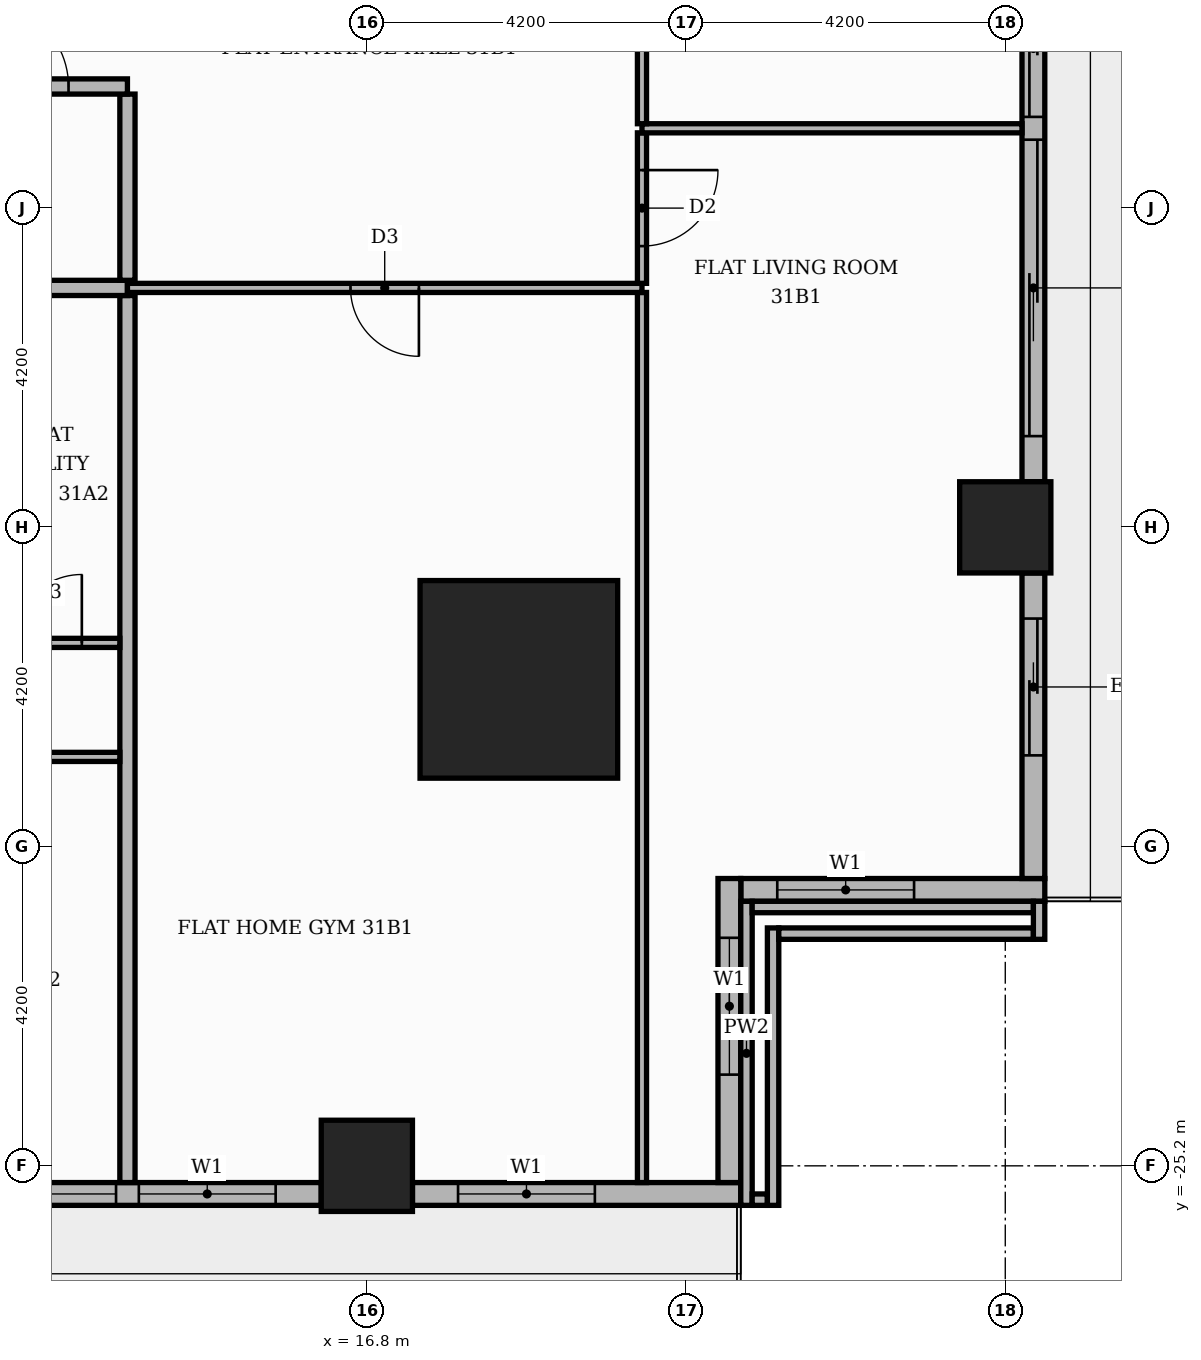
"""IFC4 building model, lengths in metres.
Left out: names, types, materials, properties, quantities, classifications, styles, units other than length and angle.
Written with IfcOpenShell. Run it as: python <this file> out.ifc"""

import sys

from ifc_helpers import new_model, si_unit, direction, frame, frame_2d, origin, origin_2d, place, context, subcontext, project, spatial, rectangle, extrude, element, fill, save


model = new_model("IFC4")
c1 = context("Model", 3, precision=1e-05, world=origin(), true_north=direction((0.0, 1.0)))
c2 = subcontext(c1, "Body", "Model", "MODEL_VIEW")
j1 = project(units=[si_unit("LENGTHUNIT", "METRE"), si_unit("PLANEANGLEUNIT", "RADIAN")], contexts=[c1])
p1 = place(None, origin())
s1 = spatial("IfcSite", under=j1, at=p1, CompositionType="ELEMENT")
p2 = place(p1, origin())
s2 = spatial("IfcBuilding", under=s1, at=p2, CompositionType="ELEMENT")
p3 = place(p2, frame((0.0, 0.0, 133.8)))
s3 = spatial("IfcBuildingStorey", under=s2, at=p3, CompositionType="ELEMENT", Elevation=133.8)
p4 = place(p3, frame((18.8, -18.8, 0.0), z_axis=(0.0, 0.0, 1.0), x_axis=(1.0, 0.0, 0.0)))
e1 = element("IfcColumn", 1, at=p4, inside=s3, PredefinedType="COLUMN", context=c2, shape_type="SweptSolid", body=[
    extrude(rectangle(XDim=2.6, YDim=2.6, at=origin_2d()), origin(), (0.0, 0.0, 1.0), 3.9),
])
for number, where, z_axis, x_axis in (
    (2, (25.2, -16.8, 0.0), (0.0, 0.0, 1.0), (1.0, 0.0, 0.0)),
    (3, (16.8, -25.2, 0.0), (0.0, 0.0, 1.0), (1.0, 0.0, 0.0)),
):
    element("IfcColumn", number, at=place(p3, frame(where, z_axis=z_axis, x_axis=x_axis)), inside=s3, PredefinedType="COLUMN", context=c2, shape_type="SweptSolid", body=[
        extrude(rectangle(XDim=1.2, YDim=1.2, at=origin_2d()), origin(), (0.0, 0.0, 1.0), 3.9),
    ])
p5 = place(p3, frame((21.72, -21.57, 0.0), z_axis=(0.0, 0.0, 1.0), x_axis=(1.0, 0.0, 0.0)))
e4 = element("IfcWall", 4, at=p5, inside=s3, PredefinedType="STANDARD", context=c2, shape_type="SweptSolid", body=[
    extrude(rectangle(XDim=4.0, YDim=0.3, at=frame_2d((2.0, 0.0))), origin(), (0.0, 0.0, 1.0), 3.48),
])
p6 = place(p5, frame((0.48, 0.0, 0.9)))
e5 = element("IfcOpeningElement", 5, at=p6, cuts=e4, PredefinedType="OPENING", context=c2, shape_type="SweptSolid", body=[
    extrude(rectangle(XDim=1.8, YDim=2.1, at=frame_2d((0.9, 1.05))), frame((0.0, 0.16, 0.0), z_axis=(0.0, -1.0, 0.0), x_axis=(1.0, 0.0, 0.0)), (0.0, 0.0, 1.0), 0.32),
])
p7 = place(p3, frame((25.57, -21.42, 0.0), z_axis=(0.0, 0.0, 1.0), x_axis=(0.0, 1.0, 0.0)))
e6 = element("IfcWall", 6, at=p7, inside=s3, PredefinedType="STANDARD", context=c2, shape_type="SweptSolid", body=[
    extrude(rectangle(XDim=4.02, YDim=0.3, at=frame_2d((2.01, 0.0))), origin(), (0.0, 0.0, 1.0), 3.48),
])
p8 = place(p7, frame((1.62, 0.0, 0.0)))
e7 = element("IfcOpeningElement", 7, at=p8, cuts=e6, PredefinedType="OPENING", context=c2, shape_type="SweptSolid", body=[
    extrude(rectangle(XDim=1.8, YDim=2.4, at=frame_2d((0.9, 1.2))), frame((0.0, 0.16, 0.0), z_axis=(0.0, -1.0, 0.0), x_axis=(1.0, 0.0, 0.0)), (0.0, 0.0, 1.0), 0.32),
])
p9 = place(p3, frame((25.57, -16.2, 0.0), z_axis=(0.0, 0.0, 1.0), x_axis=(0.0, 1.0, 0.0)))
e8 = element("IfcWall", 8, at=p9, inside=s3, PredefinedType="STANDARD", context=c2, shape_type="SweptSolid", body=[
    extrude(rectangle(XDim=7.2, YDim=0.3, at=frame_2d((3.6, 0.0))), origin(), (0.0, 0.0, 1.0), 3.48),
])
p10 = place(p9, frame((0.6, 0.0, 0.0)))
e9 = element("IfcOpeningElement", 9, at=p10, cuts=e8, PredefinedType="OPENING", context=c2, shape_type="SweptSolid", body=[
    extrude(rectangle(XDim=3.9, YDim=2.4, at=frame_2d((1.95, 1.2))), frame((0.0, 0.16, 0.0), z_axis=(0.0, -1.0, 0.0), x_axis=(1.0, 0.0, 0.0)), (0.0, 0.0, 1.0), 0.32),
])
p11 = place(p9, frame((4.8, 0.0, 0.0)))
e10 = element("IfcOpeningElement", 10, at=p11, cuts=e8, PredefinedType="OPENING", context=c2, shape_type="SweptSolid", body=[
    extrude(rectangle(XDim=1.8, YDim=2.4, at=frame_2d((0.9, 1.2))), frame((0.0, 0.16, 0.0), z_axis=(0.0, -1.0, 0.0), x_axis=(1.0, 0.0, 0.0)), (0.0, 0.0, 1.0), 0.32),
])
p12 = place(p3, frame((9.0, -25.57, 0.0), z_axis=(0.0, 0.0, 1.0), x_axis=(1.0, 0.0, 0.0)))
e11 = element("IfcWall", 11, at=p12, inside=s3, PredefinedType="STANDARD", context=c2, shape_type="SweptSolid", body=[
    extrude(rectangle(XDim=7.2, YDim=0.3, at=frame_2d((3.6, 0.0))), origin(), (0.0, 0.0, 1.0), 3.48),
])
p13 = place(p12, frame((0.6, 0.0, 0.9)))
e12 = element("IfcOpeningElement", 12, at=p13, cuts=e11, PredefinedType="OPENING", context=c2, shape_type="SweptSolid", body=[
    extrude(rectangle(XDim=3.9, YDim=2.1, at=frame_2d((1.95, 1.05))), frame((0.0, 0.16, 0.0), z_axis=(0.0, -1.0, 0.0), x_axis=(1.0, 0.0, 0.0)), (0.0, 0.0, 1.0), 0.32),
])
p14 = place(p12, frame((4.8, 0.0, 0.9)))
e13 = element("IfcOpeningElement", 13, at=p14, cuts=e11, PredefinedType="OPENING", context=c2, shape_type="SweptSolid", body=[
    extrude(rectangle(XDim=1.8, YDim=2.1, at=frame_2d((0.9, 1.05))), frame((0.0, 0.16, 0.0), z_axis=(0.0, -1.0, 0.0), x_axis=(1.0, 0.0, 0.0)), (0.0, 0.0, 1.0), 0.32),
])
p15 = place(p3, frame((17.4, -25.57, 0.0), z_axis=(0.0, 0.0, 1.0), x_axis=(1.0, 0.0, 0.0)))
e14 = element("IfcWall", 14, at=p15, inside=s3, PredefinedType="STANDARD", context=c2, shape_type="SweptSolid", body=[
    extrude(rectangle(XDim=4.32, YDim=0.3, at=frame_2d((2.16, 0.0))), origin(), (0.0, 0.0, 1.0), 3.48),
])
p16 = place(p15, frame((0.6, 0.0, 0.9)))
e15 = element("IfcOpeningElement", 15, at=p16, cuts=e14, PredefinedType="OPENING", context=c2, shape_type="SweptSolid", body=[
    extrude(rectangle(XDim=1.8, YDim=2.1, at=frame_2d((0.9, 1.05))), frame((0.0, 0.16, 0.0), z_axis=(0.0, -1.0, 0.0), x_axis=(1.0, 0.0, 0.0)), (0.0, 0.0, 1.0), 0.32),
])
p17 = place(p3, frame((21.57, -25.42, 0.0), z_axis=(0.0, 0.0, 1.0), x_axis=(0.0, 1.0, 0.0)))
e16 = element("IfcWall", 16, at=p17, inside=s3, PredefinedType="STANDARD", context=c2, shape_type="SweptSolid", body=[
    extrude(rectangle(XDim=4.0, YDim=0.3, at=frame_2d((2.0, 0.0))), origin(), (0.0, 0.0, 1.0), 3.48),
])
p18 = place(p17, frame((1.42, 0.0, 0.9)))
e17 = element("IfcOpeningElement", 17, at=p18, cuts=e16, PredefinedType="OPENING", context=c2, shape_type="SweptSolid", body=[
    extrude(rectangle(XDim=1.8, YDim=2.1, at=frame_2d((0.9, 1.05))), frame((0.0, 0.16, 0.0), z_axis=(0.0, -1.0, 0.0), x_axis=(1.0, 0.0, 0.0)), (0.0, 0.0, 1.0), 0.32),
])
p19 = place(p3, frame((21.795, -25.72, 0.0), z_axis=(0.0, 0.0, 1.0), x_axis=(0.0, 1.0, 0.0)))
e18 = element("IfcWall", 18, at=p19, inside=s3, PredefinedType="PARAPET", context=c2, shape_type="SweptSolid", body=[
    extrude(rectangle(XDim=4.0, YDim=0.15, at=frame_2d((2.0, 0.0))), origin(), (0.0, 0.0, 1.0), 1.1),
])
p20 = place(p3, frame((21.87, -25.645, 0.0), z_axis=(0.0, 0.0, 1.0), x_axis=(1.0, 0.0, 0.0)))
e19 = element("IfcWall", 19, at=p20, inside=s3, PredefinedType="PARAPET", context=c2, shape_type="SweptSolid", body=[
    extrude(rectangle(XDim=0.2, YDim=0.15, at=frame_2d((0.1, 0.0))), origin(), (0.0, 0.0, 1.0), 1.1),
])
p21 = place(p3, frame((21.87, -21.795, 0.0), z_axis=(0.0, 0.0, 1.0), x_axis=(1.0, 0.0, 0.0)))
e20 = element("IfcWall", 20, at=p21, inside=s3, PredefinedType="PARAPET", context=c2, shape_type="SweptSolid", body=[
    extrude(rectangle(XDim=3.7, YDim=0.15, at=frame_2d((1.85, 0.0))), origin(), (0.0, 0.0, 1.0), 1.1),
])
p22 = place(p3, frame((22.145, -25.72, 0.0), z_axis=(0.0, 0.0, 1.0), x_axis=(0.0, 1.0, 0.0)))
e21 = element("IfcWall", 21, at=p22, inside=s3, PredefinedType="PARAPET", context=c2, shape_type="SweptSolid", body=[
    extrude(rectangle(XDim=3.65, YDim=0.15, at=frame_2d((1.825, 0.0))), origin(), (0.0, 0.0, 1.0), 1.1),
])
p23 = place(p3, frame((22.22, -22.145, 0.0), z_axis=(0.0, 0.0, 1.0), x_axis=(1.0, 0.0, 0.0)))
e22 = element("IfcWall", 22, at=p23, inside=s3, PredefinedType="PARAPET", context=c2, shape_type="SweptSolid", body=[
    extrude(rectangle(XDim=3.35, YDim=0.15, at=frame_2d((1.675, 0.0))), origin(), (0.0, 0.0, 1.0), 1.1),
])
p24 = place(p3, frame((25.645, -22.22, 0.0), z_axis=(0.0, 0.0, 1.0), x_axis=(0.0, 1.0, 0.0)))
e23 = element("IfcWall", 23, at=p24, inside=s3, PredefinedType="PARAPET", context=c2, shape_type="SweptSolid", body=[
    extrude(rectangle(XDim=0.5, YDim=0.15, at=frame_2d((0.25, 0.0))), origin(), (0.0, 0.0, 1.0), 1.1),
])
p25 = place(p3, frame((13.65, -25.42, 0.0), z_axis=(0.0, 0.0, 1.0), x_axis=(0.0, 1.0, 0.0)))
e24 = element("IfcWall", 24, at=p25, inside=s3, PredefinedType="PARTITIONING", context=c2, shape_type="SweptSolid", body=[
    extrude(rectangle(XDim=11.67, YDim=0.2, at=frame_2d((5.835, 0.0))), origin(), (0.0, 0.0, 1.0), 3.48),
])
p26 = place(p3, frame((20.42, -25.42, 0.0), z_axis=(0.0, 0.0, 1.0), x_axis=(0.0, 1.0, 0.0)))
e25 = element("IfcWall", 25, at=p26, inside=s3, PredefinedType="PARTITIONING", context=c2, shape_type="SweptSolid", body=[
    extrude(rectangle(XDim=11.71, YDim=0.12, at=frame_2d((5.855, 0.0))), origin(), (0.0, 0.0, 1.0), 3.48),
])
p27 = place(p3, frame((-5.15, -19.82, 0.0), z_axis=(0.0, 0.0, 1.0), x_axis=(1.0, 0.0, 0.0)))
e26 = element("IfcWall", 26, at=p27, inside=s3, PredefinedType="PARTITIONING", context=c2, shape_type="SweptSolid", body=[
    extrude(rectangle(XDim=18.7, YDim=0.12, at=frame_2d((9.35, 0.0))), origin(), (0.0, 0.0, 1.0), 3.48),
])
p28 = place(p27, frame((2.55, 0.0, 0.0)))
e27 = element("IfcOpeningElement", 27, at=p28, cuts=e26, PredefinedType="OPENING", context=c2, shape_type="SweptSolid", body=[
    extrude(rectangle(XDim=1.0, YDim=2.1, at=frame_2d((0.5, 1.05))), frame((0.0, 0.07, 0.0), z_axis=(0.0, -1.0, 0.0), x_axis=(1.0, 0.0, 0.0)), (0.0, 0.0, 1.0), 0.14),
])
p29 = place(p27, frame((7.85, 0.0, 0.0)))
e28 = element("IfcOpeningElement", 28, at=p29, cuts=e26, PredefinedType="OPENING", context=c2, shape_type="SweptSolid", body=[
    extrude(rectangle(XDim=0.9, YDim=2.1, at=frame_2d((0.45, 1.05))), frame((0.0, 0.07, 0.0), z_axis=(0.0, -1.0, 0.0), x_axis=(1.0, 0.0, 0.0)), (0.0, 0.0, 1.0), 0.14),
])
p30 = place(p27, frame((16.25, 0.0, 0.0)))
e29 = element("IfcOpeningElement", 29, at=p30, cuts=e26, PredefinedType="OPENING", context=c2, shape_type="SweptSolid", body=[
    extrude(rectangle(XDim=0.9, YDim=2.1, at=frame_2d((0.45, 1.05))), frame((0.0, 0.07, 0.0), z_axis=(0.0, -1.0, 0.0), x_axis=(1.0, 0.0, 0.0)), (0.0, 0.0, 1.0), 0.14),
])
p31 = place(p3, frame((3.15, -18.32, 0.0), z_axis=(0.0, 0.0, 1.0), x_axis=(1.0, 0.0, 0.0)))
e30 = element("IfcWall", 30, at=p31, inside=s3, PredefinedType="PARTITIONING", context=c2, shape_type="SweptSolid", body=[
    extrude(rectangle(XDim=10.4, YDim=0.12, at=frame_2d((5.2, 0.0))), origin(), (0.0, 0.0, 1.0), 3.48),
])
p32 = place(p31, frame((2.775, 0.0, 0.0)))
e31 = element("IfcOpeningElement", 31, at=p32, cuts=e30, PredefinedType="OPENING", context=c2, shape_type="SweptSolid", body=[
    extrude(rectangle(XDim=0.9, YDim=2.1, at=frame_2d((0.45, 1.05))), frame((0.0, 0.07, 0.0), z_axis=(0.0, -1.0, 0.0), x_axis=(1.0, 0.0, 0.0)), (0.0, 0.0, 1.0), 0.14),
])
p33 = place(p31, frame((6.975, 0.0, 0.0)))
e32 = element("IfcOpeningElement", 32, at=p33, cuts=e30, PredefinedType="OPENING", context=c2, shape_type="SweptSolid", body=[
    extrude(rectangle(XDim=0.9, YDim=2.1, at=frame_2d((0.45, 1.05))), frame((0.0, 0.07, 0.0), z_axis=(0.0, -1.0, 0.0), x_axis=(1.0, 0.0, 0.0)), (0.0, 0.0, 1.0), 0.14),
])
p34 = place(p31, frame((9.0, 0.0, 0.0)))
e33 = element("IfcOpeningElement", 33, at=p34, cuts=e30, PredefinedType="OPENING", context=c2, shape_type="SweptSolid", body=[
    extrude(rectangle(XDim=0.9, YDim=2.1, at=frame_2d((0.45, 1.05))), frame((0.0, 0.07, 0.0), z_axis=(0.0, -1.0, 0.0), x_axis=(1.0, 0.0, 0.0)), (0.0, 0.0, 1.0), 0.14),
])
p35 = place(p3, frame((-25.42, -13.65, 0.0), z_axis=(0.0, 0.0, 1.0), x_axis=(1.0, 0.0, 0.0)))
e34 = element("IfcWall", 34, at=p35, inside=s3, PredefinedType="PARTITIONING", context=c2, shape_type="SweptSolid", body=[
    extrude(rectangle(XDim=39.07, YDim=0.2, at=frame_2d((19.535, 0.0))), origin(), (0.0, 0.0, 1.0), 3.48),
])
p36 = place(p35, frame((13.32, 0.0, 0.0)))
e35 = element("IfcOpeningElement", 35, at=p36, cuts=e34, PredefinedType="OPENING", context=c2, shape_type="SweptSolid", body=[
    extrude(rectangle(XDim=1.1, YDim=2.4, at=frame_2d((0.55, 1.2))), frame((0.0, 0.11, 0.0), z_axis=(0.0, -1.0, 0.0), x_axis=(1.0, 0.0, 0.0)), (0.0, 0.0, 1.0), 0.22),
])
p37 = place(p35, frame((25.92, 0.0, 0.0)))
e36 = element("IfcOpeningElement", 36, at=p37, cuts=e34, PredefinedType="OPENING", context=c2, shape_type="SweptSolid", body=[
    extrude(rectangle(XDim=1.1, YDim=2.4, at=frame_2d((0.55, 1.2))), frame((0.0, 0.11, 0.0), z_axis=(0.0, -1.0, 0.0), x_axis=(1.0, 0.0, 0.0)), (0.0, 0.0, 1.0), 0.22),
])
p38 = place(p3, frame((13.65, -13.65, 0.0), z_axis=(0.0, 0.0, 1.0), x_axis=(1.0, 0.0, 0.0)))
e37 = element("IfcWall", 37, at=p38, inside=s3, PredefinedType="PARTITIONING", context=c2, shape_type="SweptSolid", body=[
    extrude(rectangle(XDim=6.77, YDim=0.12, at=frame_2d((3.385, 0.0))), origin(), (0.0, 0.0, 1.0), 3.48),
])
p39 = place(p38, frame((2.935, 0.0, 0.0)))
e38 = element("IfcOpeningElement", 38, at=p39, cuts=e37, PredefinedType="OPENING", context=c2, shape_type="SweptSolid", body=[
    extrude(rectangle(XDim=0.9, YDim=2.1, at=frame_2d((0.45, 1.05))), frame((0.0, 0.07, 0.0), z_axis=(0.0, -1.0, 0.0), x_axis=(1.0, 0.0, 0.0)), (0.0, 0.0, 1.0), 0.14),
])
p40 = place(p3, frame((20.42, -13.59, 0.0), z_axis=(0.0, 0.0, 1.0), x_axis=(0.0, 1.0, 0.0)))
e39 = element("IfcWall", 39, at=p40, inside=s3, PredefinedType="PARTITIONING", context=c2, shape_type="SweptSolid", body=[
    extrude(rectangle(XDim=1.98, YDim=0.12, at=frame_2d((0.99, 0.0))), origin(), (0.0, 0.0, 1.0), 3.48),
])
p41 = place(p40, frame((0.49, 0.0, 0.0)))
e40 = element("IfcOpeningElement", 40, at=p41, cuts=e39, PredefinedType="OPENING", context=c2, shape_type="SweptSolid", body=[
    extrude(rectangle(XDim=1.0, YDim=2.1, at=frame_2d((0.5, 1.05))), frame((0.0, 0.07, 0.0), z_axis=(0.0, -1.0, 0.0), x_axis=(1.0, 0.0, 0.0)), (0.0, 0.0, 1.0), 0.14),
])
p42 = place(p3, frame((13.65, -13.55, 0.0), z_axis=(0.0, 0.0, 1.0), x_axis=(0.0, 1.0, 0.0)))
e41 = element("IfcWall", 41, at=p42, inside=s3, PredefinedType="PARTITIONING", context=c2, shape_type="SweptSolid", body=[
    extrude(rectangle(XDim=2.45, YDim=0.2, at=frame_2d((1.225, 0.0))), origin(), (0.0, 0.0, 1.0), 3.48),
])
p43 = place(p3, frame((20.42, -11.55, 0.0), z_axis=(0.0, 0.0, 1.0), x_axis=(1.0, 0.0, 0.0)))
e42 = element("IfcWall", 42, at=p43, inside=s3, PredefinedType="PARTITIONING", context=c2, shape_type="SweptSolid", body=[
    extrude(rectangle(XDim=5.0, YDim=0.12, at=frame_2d((2.5, 0.0))), origin(), (0.0, 0.0, 1.0), 3.48),
])
p44 = place(p3, frame((20.42, -11.49, 0.0), z_axis=(0.0, 0.0, 1.0), x_axis=(0.0, 1.0, 0.0)))
e43 = element("IfcWall", 43, at=p44, inside=s3, PredefinedType="PARTITIONING", context=c2, shape_type="SweptSolid", body=[
    extrude(rectangle(XDim=6.18, YDim=0.12, at=frame_2d((3.09, 0.0))), origin(), (0.0, 0.0, 1.0), 3.48),
])
p45 = place(p44, frame((2.59, 0.0, 0.0)))
e44 = element("IfcOpeningElement", 44, at=p45, cuts=e43, PredefinedType="OPENING", context=c2, shape_type="SweptSolid", body=[
    extrude(rectangle(XDim=1.0, YDim=2.1, at=frame_2d((0.5, 1.05))), frame((0.0, 0.07, 0.0), z_axis=(0.0, -1.0, 0.0), x_axis=(1.0, 0.0, 0.0)), (0.0, 0.0, 1.0), 0.14),
])
p46 = place(p3, frame((11.0, -11.0, 0.0), z_axis=(0.0, 0.0, 1.0), x_axis=(1.0, 0.0, 0.0)))
e45 = element("IfcWall", 45, at=p46, inside=s3, PredefinedType="PARTITIONING", context=c2, shape_type="SweptSolid", body=[
    extrude(rectangle(XDim=2.65, YDim=0.2, at=frame_2d((1.325, 0.0))), origin(), (0.0, 0.0, 1.0), 3.48),
])
p47 = place(p46, frame((0.775, 0.0, 0.0)))
e46 = element("IfcOpeningElement", 46, at=p47, cuts=e45, PredefinedType="OPENING", context=c2, shape_type="SweptSolid", body=[
    extrude(rectangle(XDim=1.1, YDim=2.4, at=frame_2d((0.55, 1.2))), frame((0.0, 0.11, 0.0), z_axis=(0.0, -1.0, 0.0), x_axis=(1.0, 0.0, 0.0)), (0.0, 0.0, 1.0), 0.22),
])
p48 = place(p6, origin())
e47 = element("IfcWindow", 47, at=p48, inside=s3, PartitioningType="SINGLE_PANEL", PredefinedType="WINDOW", context=c2, shape_type="SweptSolid", body=[
    extrude(rectangle(XDim=1.8, YDim=2.1, at=frame_2d((0.9, 1.05))), frame((0.0, 0.03, 0.0), z_axis=(0.0, -1.0, 0.0), x_axis=(1.0, 0.0, 0.0)), (0.0, 0.0, 1.0), 0.06),
])
fill(e5, e47)
p49 = place(p8, origin())
e48 = element("IfcDoor", 48, at=p49, inside=s3, OperationType="SLIDING_TO_RIGHT", PredefinedType="DOOR", context=c2, shape_type="SweptSolid", body=[
    extrude(rectangle(XDim=1.8, YDim=2.4, at=frame_2d((0.9, 1.2))), frame((0.0, 0.025, 0.0), z_axis=(0.0, -1.0, 0.0), x_axis=(1.0, 0.0, 0.0)), (0.0, 0.0, 1.0), 0.05),
])
fill(e7, e48)
p50 = place(p10, origin())
e49 = element("IfcDoor", 49, at=p50, inside=s3, OperationType="SLIDING_TO_LEFT", PredefinedType="DOOR", context=c2, shape_type="SweptSolid", body=[
    extrude(rectangle(XDim=3.9, YDim=2.4, at=frame_2d((1.95, 1.2))), frame((0.0, 0.025, 0.0), z_axis=(0.0, -1.0, 0.0), x_axis=(1.0, 0.0, 0.0)), (0.0, 0.0, 1.0), 0.05),
])
fill(e9, e49)
p51 = place(p11, origin())
e50 = element("IfcDoor", 50, at=p51, inside=s3, OperationType="SLIDING_TO_RIGHT", PredefinedType="DOOR", context=c2, shape_type="SweptSolid", body=[
    extrude(rectangle(XDim=1.8, YDim=2.4, at=frame_2d((0.9, 1.2))), frame((0.0, 0.025, 0.0), z_axis=(0.0, -1.0, 0.0), x_axis=(1.0, 0.0, 0.0)), (0.0, 0.0, 1.0), 0.05),
])
fill(e10, e50)
p52 = place(p13, origin())
e51 = element("IfcWindow", 51, at=p52, inside=s3, PartitioningType="SINGLE_PANEL", PredefinedType="WINDOW", context=c2, shape_type="SweptSolid", body=[
    extrude(rectangle(XDim=3.9, YDim=2.1, at=frame_2d((1.95, 1.05))), frame((0.0, 0.03, 0.0), z_axis=(0.0, -1.0, 0.0), x_axis=(1.0, 0.0, 0.0)), (0.0, 0.0, 1.0), 0.06),
])
fill(e12, e51)
p53 = place(p14, origin())
e52 = element("IfcWindow", 52, at=p53, inside=s3, PartitioningType="SINGLE_PANEL", PredefinedType="WINDOW", context=c2, shape_type="SweptSolid", body=[
    extrude(rectangle(XDim=1.8, YDim=2.1, at=frame_2d((0.9, 1.05))), frame((0.0, 0.03, 0.0), z_axis=(0.0, -1.0, 0.0), x_axis=(1.0, 0.0, 0.0)), (0.0, 0.0, 1.0), 0.06),
])
fill(e13, e52)
p54 = place(p16, origin())
e53 = element("IfcWindow", 53, at=p54, inside=s3, PartitioningType="SINGLE_PANEL", PredefinedType="WINDOW", context=c2, shape_type="SweptSolid", body=[
    extrude(rectangle(XDim=1.8, YDim=2.1, at=frame_2d((0.9, 1.05))), frame((0.0, 0.03, 0.0), z_axis=(0.0, -1.0, 0.0), x_axis=(1.0, 0.0, 0.0)), (0.0, 0.0, 1.0), 0.06),
])
fill(e15, e53)
p55 = place(p18, origin())
e54 = element("IfcWindow", 54, at=p55, inside=s3, PartitioningType="SINGLE_PANEL", PredefinedType="WINDOW", context=c2, shape_type="SweptSolid", body=[
    extrude(rectangle(XDim=1.8, YDim=2.1, at=frame_2d((0.9, 1.05))), frame((0.0, 0.03, 0.0), z_axis=(0.0, -1.0, 0.0), x_axis=(1.0, 0.0, 0.0)), (0.0, 0.0, 1.0), 0.06),
])
fill(e17, e54)
p56 = place(p34, origin())
e55 = element("IfcDoor", 55, at=p56, inside=s3, OperationType="SINGLE_SWING_RIGHT", PredefinedType="DOOR", context=c2, shape_type="SweptSolid", body=[
    extrude(rectangle(XDim=0.9, YDim=2.1, at=frame_2d((0.45, 1.05))), frame((0.0, 0.025, 0.0), z_axis=(0.0, -1.0, 0.0), x_axis=(1.0, 0.0, 0.0)), (0.0, 0.0, 1.0), 0.05),
])
fill(e33, e55)
p57 = place(p47, origin())
e56 = element("IfcDoor", 56, at=p57, inside=s3, OperationType="SINGLE_SWING_LEFT", PredefinedType="DOOR", context=c2, shape_type="SweptSolid", body=[
    extrude(rectangle(XDim=1.1, YDim=2.4, at=frame_2d((0.55, 1.2))), frame((0.0, 0.025, 0.0), z_axis=(0.0, -1.0, 0.0), x_axis=(1.0, 0.0, 0.0)), (0.0, 0.0, 1.0), 0.05),
])
fill(e46, e56)
p58 = place(p39, frame((0.9, 0.0, 0.0), z_axis=(0.0, 0.0, 1.0), x_axis=(-1.0, 0.0, 0.0)))
e57 = element("IfcDoor", 57, at=p58, inside=s3, OperationType="SINGLE_SWING_RIGHT", PredefinedType="DOOR", context=c2, shape_type="SweptSolid", body=[
    extrude(rectangle(XDim=0.9, YDim=2.1, at=frame_2d((0.45, 1.05))), frame((0.0, 0.025, 0.0), z_axis=(0.0, -1.0, 0.0), x_axis=(1.0, 0.0, 0.0)), (0.0, 0.0, 1.0), 0.05),
])
fill(e38, e57)
p59 = place(p41, frame((1.0, 0.0, 0.0), z_axis=(0.0, 0.0, 1.0), x_axis=(-1.0, 0.0, 0.0)))
e58 = element("IfcDoor", 58, at=p59, inside=s3, OperationType="SINGLE_SWING_RIGHT", PredefinedType="DOOR", context=c2, shape_type="SweptSolid", body=[
    extrude(rectangle(XDim=1.0, YDim=2.1, at=frame_2d((0.5, 1.05))), frame((0.0, 0.025, 0.0), z_axis=(0.0, -1.0, 0.0), x_axis=(1.0, 0.0, 0.0)), (0.0, 0.0, 1.0), 0.05),
])
fill(e40, e58)
save(model, sys.argv[1])
